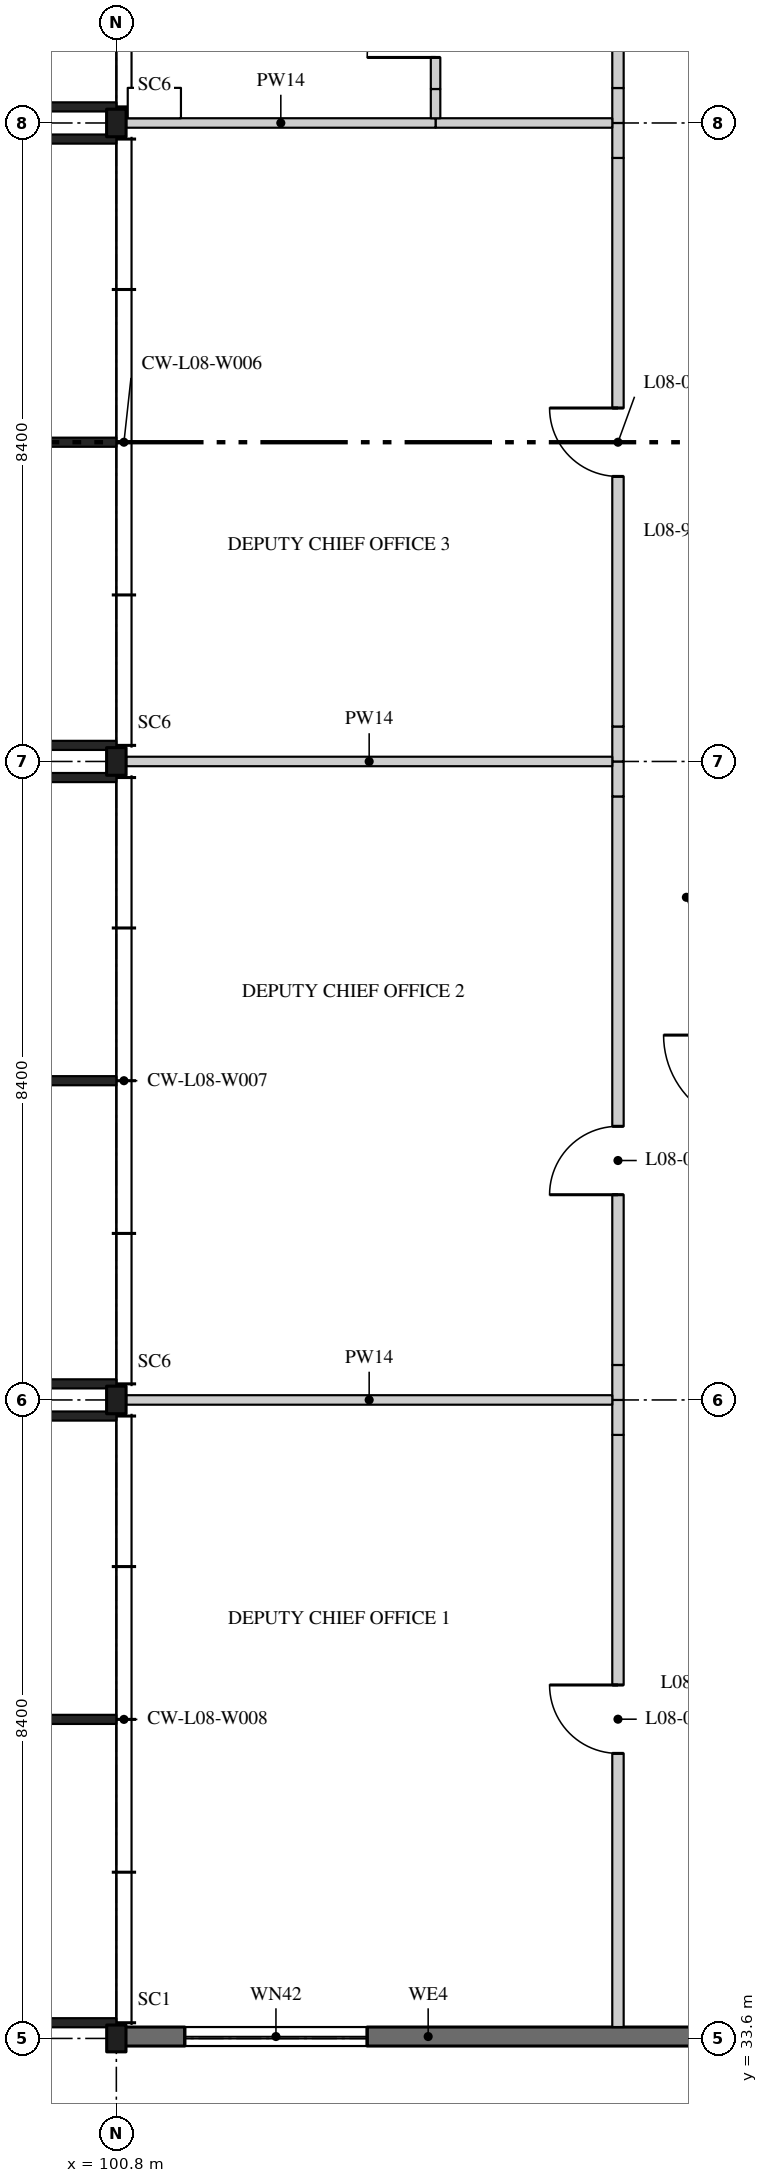
"""IFC4 building model, lengths in metres.
Left out: names, types, materials, properties, quantities, classifications, styles, units other than length and angle.
Written with IfcOpenShell. Run it as: python <this file> out.ifc"""

import sys

from ifc_helpers import new_model, si_unit, direction, frame, frame_2d, origin, origin_2d, place, context, subcontext, project, spatial, rectangle, i_section, extrude, element, fill, save


model = new_model("IFC4")
c1 = context("Model", 3, precision=1e-05, world=origin(), true_north=direction((0.0, 1.0)))
c2 = subcontext(c1, "Body", "Model", "MODEL_VIEW")
j1 = project(units=[si_unit("LENGTHUNIT", "METRE"), si_unit("PLANEANGLEUNIT", "RADIAN")], contexts=[c1])
p1 = place(None, origin())
s1 = spatial("IfcSite", under=j1, at=p1, CompositionType="ELEMENT")
p2 = place(p1, origin())
s2 = spatial("IfcBuilding", under=s1, at=p2, CompositionType="ELEMENT")
p3 = place(p2, frame((0.0, 0.0, 36.9)))
s3 = spatial("IfcBuildingStorey", under=s2, at=p3, CompositionType="ELEMENT", Elevation=36.9)
p4 = place(p3, frame((100.8, 33.6, 0.0), z_axis=(0.0, 0.0, 1.0), x_axis=(1.0, 0.0, 0.0)))
e1 = element("IfcColumn", 1, at=p4, inside=s3, PredefinedType="COLUMN", context=c2, shape_type="SweptSolid", body=[
    extrude(i_section(OverallWidth=0.254, OverallDepth=0.353, WebThickness=0.01, FlangeThickness=0.016, FilletRadius=0.015, at=origin_2d()), origin(), (0.0, 0.0, 1.0), 4.37),
])
for number, where, z_axis, x_axis in (
    (2, (100.8, 42.0, 0.0), (0.0, 0.0, 1.0), (1.0, 0.0, 0.0)),
    (3, (100.8, 50.4, 0.0), (0.0, 0.0, 1.0), (1.0, 0.0, 0.0)),
    (4, (100.8, 58.8, 0.0), (0.0, 0.0, 1.0), (1.0, 0.0, 0.0)),
):
    element("IfcColumn", number, at=place(p3, frame(where, z_axis=z_axis, x_axis=x_axis)), inside=s3, PredefinedType="COLUMN", context=c2, shape_type="SweptSolid", body=[
        extrude(i_section(OverallWidth=0.257, OverallDepth=0.363, WebThickness=0.013, FlangeThickness=0.022, FilletRadius=0.015, at=origin_2d()), origin(), (0.0, 0.0, 1.0), 4.37),
    ])
p5 = place(p3, frame((107.4, 33.75, 0.0), z_axis=(0.0, 0.0, 1.0), x_axis=(0.0, 1.0, 0.0)))
e5 = element("IfcWall", 5, at=p5, inside=s3, PredefinedType="PARTITIONING", context=c2, shape_type="SweptSolid", body=[
    extrude(rectangle(XDim=7.79, YDim=0.15, at=frame_2d((3.895, 0.0))), origin(), (0.0, 0.0, 1.0), 4.37),
])
p6 = place(p5, frame((3.6, 0.0, 0.0)))
e6 = element("IfcOpeningElement", 6, at=p6, cuts=e5, PredefinedType="OPENING", context=c2, shape_type="SweptSolid", body=[
    extrude(rectangle(XDim=0.9, YDim=2.1, at=frame_2d((0.45, 1.05))), frame((0.0, 0.085, 0.0), z_axis=(0.0, -1.0, 0.0), x_axis=(1.0, 0.0, 0.0)), (0.0, 0.0, 1.0), 0.17),
])
for number, where, z_axis, x_axis in (
    (7, (107.4, 41.54, 0.0), (0.0, 0.0, 1.0), (0.0, 1.0, 0.0)),
    (8, (107.4, 42.0, 0.0), (0.0, 0.0, 1.0), (0.0, 1.0, 0.0)),
):
    element("IfcWall", number, at=place(p3, frame(where, z_axis=z_axis, x_axis=x_axis)), inside=s3, PredefinedType="PARTITIONING", context=c2, shape_type="SweptSolid", body=[
        extrude(rectangle(XDim=0.46, YDim=0.15, at=frame_2d((0.23, 0.0))), origin(), (0.0, 0.0, 1.0), 3.817),
    ])
p7 = place(p3, frame((107.4, 42.46, 0.0), z_axis=(0.0, 0.0, 1.0), x_axis=(0.0, 1.0, 0.0)))
e9 = element("IfcWall", 9, at=p7, inside=s3, PredefinedType="PARTITIONING", context=c2, shape_type="SweptSolid", body=[
    extrude(rectangle(XDim=7.48, YDim=0.15, at=frame_2d((3.74, 0.0))), origin(), (0.0, 0.0, 1.0), 4.37),
])
p8 = place(p7, frame((2.24, 0.0, 0.0)))
e10 = element("IfcOpeningElement", 10, at=p8, cuts=e9, PredefinedType="OPENING", context=c2, shape_type="SweptSolid", body=[
    extrude(rectangle(XDim=0.9, YDim=2.1, at=frame_2d((0.45, 1.05))), frame((0.0, 0.085, 0.0), z_axis=(0.0, -1.0, 0.0), x_axis=(1.0, 0.0, 0.0)), (0.0, 0.0, 1.0), 0.17),
])
p9 = place(p3, frame((107.4, 49.94, 0.0), z_axis=(0.0, 0.0, 1.0), x_axis=(0.0, 1.0, 0.0)))
e11 = element("IfcWall", 11, at=p9, inside=s3, PredefinedType="PARTITIONING", context=c2, shape_type="SweptSolid", body=[
    extrude(rectangle(XDim=0.46, YDim=0.15, at=frame_2d((0.23, 0.0))), origin(), (0.0, 0.0, 1.0), 3.817),
])
p10 = place(p3, frame((107.4, 50.4, 0.0), z_axis=(0.0, 0.0, 1.0), x_axis=(0.0, 1.0, 0.0)))
e12 = element("IfcWall", 12, at=p10, inside=s3, PredefinedType="PARTITIONING", context=c2, shape_type="SweptSolid", body=[
    extrude(rectangle(XDim=0.46, YDim=0.15, at=frame_2d((0.23, 0.0))), origin(), (0.0, 0.0, 1.0), 3.817),
])
p11 = place(p3, frame((107.4, 50.86, 0.0), z_axis=(0.0, 0.0, 1.0), x_axis=(0.0, 1.0, 0.0)))
e13 = element("IfcWall", 13, at=p11, inside=s3, PredefinedType="PARTITIONING", context=c2, shape_type="SweptSolid", body=[
    extrude(rectangle(XDim=7.48, YDim=0.15, at=frame_2d((3.74, 0.0))), origin(), (0.0, 0.0, 1.0), 4.37),
])
p12 = place(p11, frame((3.29, 0.0, 0.0)))
e14 = element("IfcOpeningElement", 14, at=p12, cuts=e13, PredefinedType="OPENING", context=c2, shape_type="SweptSolid", body=[
    extrude(rectangle(XDim=0.9, YDim=2.1, at=frame_2d((0.45, 1.05))), frame((0.0, 0.085, 0.0), z_axis=(0.0, -1.0, 0.0), x_axis=(1.0, 0.0, 0.0)), (0.0, 0.0, 1.0), 0.17),
])
for number, where, z_axis, x_axis in (
    (15, (107.4, 58.34, 0.0), (0.0, 0.0, 1.0), (0.0, 1.0, 0.0)),
    (16, (107.4, 58.8, 0.0), (0.0, 0.0, 1.0), (0.0, 1.0, 0.0)),
):
    element("IfcWall", number, at=place(p3, frame(where, z_axis=z_axis, x_axis=x_axis)), inside=s3, PredefinedType="PARTITIONING", context=c2, shape_type="SweptSolid", body=[
        extrude(rectangle(XDim=0.46, YDim=0.15, at=frame_2d((0.23, 0.0))), origin(), (0.0, 0.0, 1.0), 3.817),
    ])
p13 = place(p3, frame((107.4, 59.26, 0.0), z_axis=(0.0, 0.0, 1.0), x_axis=(0.0, 1.0, 0.0)))
e17 = element("IfcWall", 17, at=p13, inside=s3, PredefinedType="PARTITIONING", context=c2, shape_type="SweptSolid", body=[
    extrude(rectangle(XDim=7.79, YDim=0.15, at=frame_2d((3.895, 0.0))), origin(), (0.0, 0.0, 1.0), 4.37),
])
p14 = place(p13, frame((2.09, 0.0, 0.0)))
e18 = element("IfcOpeningElement", 18, at=p14, cuts=e17, PredefinedType="OPENING", context=c2, shape_type="SweptSolid", body=[
    extrude(rectangle(XDim=0.9, YDim=2.1, at=frame_2d((0.45, 1.05))), frame((0.0, 0.085, 0.0), z_axis=(0.0, -1.0, 0.0), x_axis=(1.0, 0.0, 0.0)), (0.0, 0.0, 1.0), 0.17),
])
for number, where, z_axis, x_axis in (
    (19, (100.928, 42.0, 0.0), (0.0, 0.0, 1.0), (1.0, 0.0, 0.0)),
    (20, (100.928, 50.4, 0.0), (0.0, 0.0, 1.0), (1.0, 0.0, 0.0)),
):
    element("IfcWall", number, at=place(p3, frame(where, z_axis=z_axis, x_axis=x_axis)), inside=s3, PredefinedType="PARTITIONING", context=c2, shape_type="SweptSolid", body=[
        extrude(rectangle(XDim=6.397, YDim=0.125, at=frame_2d((3.198, 0.0))), origin(), (0.0, 0.0, 1.0), 3.817),
    ])
p15 = place(p3, frame((105.0, 58.8, 0.0), z_axis=(0.0, 0.0, 1.0), x_axis=(1.0, 0.0, 0.0)))
e21 = element("IfcWall", 21, at=p15, inside=s3, PredefinedType="PARTITIONING", context=c2, shape_type="SweptSolid", body=[
    extrude(rectangle(XDim=2.325, YDim=0.125, at=frame_2d((1.163, 0.0))), origin(), (0.0, 0.0, 1.0), 3.817),
])
p16 = place(p3, frame((100.928, 58.8, 0.0), z_axis=(0.0, 0.0, 1.0), x_axis=(1.0, 0.0, 0.0)))
e22 = element("IfcWall", 22, at=p16, inside=s3, PredefinedType="PARTITIONING", context=c2, shape_type="SweptSolid", body=[
    extrude(rectangle(XDim=4.072, YDim=0.125, at=frame_2d((2.036, 0.0))), origin(), (0.0, 0.0, 1.0), 3.817),
])
p17 = place(p3, frame((105.0, 58.862, 0.0), z_axis=(0.0, 0.0, 1.0), x_axis=(0.0, 1.0, 0.0)))
e23 = element("IfcWall", 23, at=p17, inside=s3, PredefinedType="PARTITIONING", context=c2, shape_type="SweptSolid", body=[
    extrude(rectangle(XDim=0.385, YDim=0.125, at=frame_2d((0.192, 0.0))), origin(), (0.0, 0.0, 1.0), 3.817),
])
p18 = place(p3, frame((105.0, 59.247, 0.0), z_axis=(0.0, 0.0, 1.0), x_axis=(0.0, 1.0, 0.0)))
e24 = element("IfcWall", 24, at=p18, inside=s3, PredefinedType="PARTITIONING", context=c2, shape_type="SweptSolid", body=[
    extrude(rectangle(XDim=2.553, YDim=0.125, at=frame_2d((1.276, 0.0))), origin(), (0.0, 0.0, 1.0), 4.37),
])
p19 = place(p18, frame((0.415, 0.0, 0.0)))
e25 = element("IfcOpeningElement", 25, at=p19, cuts=e24, PredefinedType="OPENING", context=c2, shape_type="SweptSolid", body=[
    extrude(rectangle(XDim=0.9, YDim=2.1, at=frame_2d((0.45, 1.05))), frame((0.0, 0.073, 0.0), z_axis=(0.0, -1.0, 0.0), x_axis=(1.0, 0.0, 0.0)), (0.0, 0.0, 1.0), 0.145),
])
p20 = place(p3, frame((100.805, 33.625, 0.0), z_axis=(0.0, 0.0, 1.0), x_axis=(1.0, 0.0, 0.0)))
e26 = element("IfcWall", 26, at=p20, inside=s3, PredefinedType="SOLIDWALL", context=c2, shape_type="SweptSolid", body=[
    extrude(rectangle(XDim=8.195, YDim=0.25, at=frame_2d((4.097, 0.0))), origin(), (0.0, 0.0, 1.0), 3.819),
])
p21 = place(p20, frame((0.895, 0.0, 0.6)))
e27 = element("IfcOpeningElement", 27, at=p21, cuts=e26, PredefinedType="OPENING", context=c2, shape_type="SweptSolid", body=[
    extrude(rectangle(XDim=2.4, YDim=2.4, at=frame_2d((1.2, 1.2))), frame((0.0, 0.135, 0.0), z_axis=(0.0, -1.0, 0.0), x_axis=(1.0, 0.0, 0.0)), (0.0, 0.0, 1.0), 0.27),
])
p22 = place(p6, origin())
e28 = element("IfcDoor", 28, at=p22, inside=s3, OperationType="SINGLE_SWING_LEFT", PredefinedType="DOOR", context=c2, shape_type="SweptSolid", body=[
    extrude(rectangle(XDim=0.9, YDim=2.1, at=frame_2d((0.45, 1.05))), frame((0.0, 0.025, 0.0), z_axis=(0.0, -1.0, 0.0), x_axis=(1.0, 0.0, 0.0)), (0.0, 0.0, 1.0), 0.05),
])
fill(e6, e28)
p23 = place(p8, origin())
e29 = element("IfcDoor", 29, at=p23, inside=s3, OperationType="SINGLE_SWING_RIGHT", PredefinedType="DOOR", context=c2, shape_type="SweptSolid", body=[
    extrude(rectangle(XDim=0.9, YDim=2.1, at=frame_2d((0.45, 1.05))), frame((0.0, 0.025, 0.0), z_axis=(0.0, -1.0, 0.0), x_axis=(1.0, 0.0, 0.0)), (0.0, 0.0, 1.0), 0.05),
])
fill(e10, e29)
p24 = place(p12, origin())
e30 = element("IfcDoor", 30, at=p24, inside=s3, OperationType="SINGLE_SWING_LEFT", PredefinedType="DOOR", context=c2, shape_type="SweptSolid", body=[
    extrude(rectangle(XDim=0.9, YDim=2.1, at=frame_2d((0.45, 1.05))), frame((0.0, 0.025, 0.0), z_axis=(0.0, -1.0, 0.0), x_axis=(1.0, 0.0, 0.0)), (0.0, 0.0, 1.0), 0.05),
])
fill(e14, e30)
p25 = place(p19, origin())
e31 = element("IfcDoor", 31, at=p25, inside=s3, OperationType="SINGLE_SWING_RIGHT", PredefinedType="DOOR", context=c2, shape_type="SweptSolid", body=[
    extrude(rectangle(XDim=0.9, YDim=2.1, at=frame_2d((0.45, 1.05))), frame((0.0, 0.02, 0.0), z_axis=(0.0, -1.0, 0.0), x_axis=(1.0, 0.0, 0.0)), (0.0, 0.0, 1.0), 0.04),
])
fill(e25, e31)
p26 = place(p21, origin())
e32 = element("IfcWindow", 32, at=p26, inside=s3, PartitioningType="SINGLE_PANEL", PredefinedType="WINDOW", context=c2, shape_type="SweptSolid", body=[
    extrude(rectangle(XDim=2.4, YDim=2.4, at=frame_2d((1.2, 1.2))), frame((0.0, 0.04, 0.0), z_axis=(0.0, -1.0, 0.0), x_axis=(1.0, 0.0, 0.0)), (0.0, 0.0, 1.0), 0.08),
])
fill(e27, e32)
save(model, sys.argv[1])
